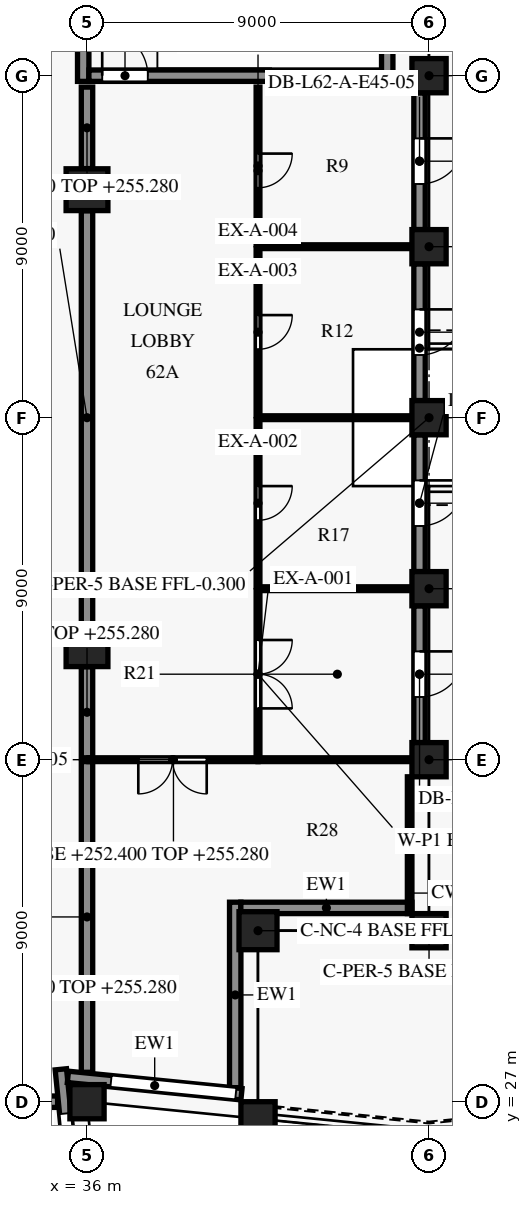
"""IFC4 building model, lengths in metres.
Left out: names, types, materials, properties, quantities, classifications, styles, units other than length and angle.
Written with IfcOpenShell. Run it as: python <this file> out.ifc"""

import sys

from ifc_helpers import new_model, si_unit, direction, frame, frame_2d, origin, origin_2d, place, context, subcontext, project, spatial, rectangle, extrude, element, fill, save


model = new_model("IFC4")
c1 = context("Model", 3, precision=1e-05, world=origin(), true_north=direction((0.0, 1.0)))
c2 = subcontext(c1, "Body", "Model", "MODEL_VIEW")
j1 = project(units=[si_unit("LENGTHUNIT", "METRE"), si_unit("PLANEANGLEUNIT", "RADIAN")], contexts=[c1])
p1 = place(None, origin())
s1 = spatial("IfcSite", under=j1, at=p1, CompositionType="ELEMENT")
p2 = place(p1, origin())
s2 = spatial("IfcBuilding", under=s1, at=p2, CompositionType="ELEMENT")
p3 = place(p2, frame((0.0, 0.0, 252.4)))
s3 = spatial("IfcBuildingStorey", under=s2, at=p3, CompositionType="ELEMENT", Elevation=252.4)
for number, where, z_axis, x_axis in (
    (1, (36.0, 27.0, 0.0), (0.0, 0.0, 1.0), (-0.1, 0.995, 0.0)),
    (2, (40.5, 26.55, 0.0), (0.0, 0.0, 1.0), (0.995, -0.1, 0.0)),
):
    element("IfcColumn", number, at=place(p3, frame(where, z_axis=z_axis, x_axis=x_axis)), inside=s3, PredefinedType="COLUMN", context=c2, shape_type="SweptSolid", body=[
        extrude(rectangle(XDim=0.9, YDim=0.9, at=origin_2d()), origin(), (0.0, 0.0, 1.0), 3.8),
    ])
for number, where, z_axis, x_axis in (
    (3, (45.0, 31.5, -0.3), (0.0, 0.0, 1.0), (0.0, 1.0, 0.0)),
    (4, (45.0, 36.0, -0.3), (0.0, 0.0, 1.0), (0.0, 1.0, 0.0)),
    (5, (45.0, 40.5, -0.3), (0.0, 0.0, 1.0), (0.0, 1.0, 0.0)),
    (6, (45.0, 45.0, -0.3), (0.0, 0.0, 1.0), (0.0, 1.0, 0.0)),
    (7, (45.0, 49.5, -0.3), (0.0, 0.0, 1.0), (0.0, 1.0, 0.0)),
    (8, (45.0, 54.0, -0.3), (0.0, 0.0, 1.0), (0.0, 1.0, 0.0)),
):
    element("IfcColumn", number, at=place(p3, frame(where, z_axis=z_axis, x_axis=x_axis)), inside=s3, PredefinedType="COLUMN", context=c2, shape_type="SweptSolid", body=[
        extrude(rectangle(XDim=0.9, YDim=0.9, at=origin_2d()), origin(), (0.0, 0.0, 1.0), 4.1),
    ])
p4 = place(p3, frame((40.5, 31.5, -0.3), z_axis=(0.0, 0.0, 1.0), x_axis=(1.0, 0.0, 0.0)))
e9 = element("IfcColumn", 9, at=p4, inside=s3, PredefinedType="COLUMN", context=c2, shape_type="SweptSolid", body=[
    extrude(rectangle(XDim=1.0, YDim=1.0, at=origin_2d()), origin(), (0.0, 0.0, 1.0), 4.1),
])
for number, where, z_axis, x_axis in (
    (10, (36.0, 39.0, 0.0), (0.0, 0.0, 1.0), (1.0, 0.0, 0.0)),
    (11, (36.0, 51.0, 0.0), (0.0, 0.0, 1.0), (1.0, 0.0, 0.0)),
):
    element("IfcColumn", number, at=place(p3, frame(where, z_axis=z_axis, x_axis=x_axis)), inside=s3, PredefinedType="COLUMN", context=c2, shape_type="SweptSolid", body=[
        extrude(rectangle(XDim=1.1, YDim=1.1, at=origin_2d()), origin(), (0.0, 0.0, 1.0), 3.8),
    ])
p5 = place(p3, frame((35.312, 27.852, 0.0), z_axis=(0.0, 0.0, 1.0), x_axis=(0.099503719021, -0.99503719021, 0.0)))
e12 = element("IfcWall", 12, at=p5, inside=s3, PredefinedType="SOLIDWALL", context=c2, shape_type="SweptSolid", body=[
    extrude(rectangle(XDim=4.62, YDim=0.3, at=frame_2d((2.31, 0.0))), origin(), (0.0, 0.0, 1.0), 3.15),
])
p6 = place(p5, frame((1.17, 0.0, 0.15)))
e13 = element("IfcOpeningElement", 13, at=p6, cuts=e12, PredefinedType="OPENING", context=c2, shape_type="SweptSolid", body=[
    extrude(rectangle(XDim=3.3, YDim=2.4, at=frame_2d((1.65, 1.2))), frame((0.0, 0.16, 0.0), z_axis=(0.0, -1.0, 0.0), x_axis=(1.0, 0.0, 0.0)), (0.0, 0.0, 1.0), 0.32),
])
p7 = place(p3, frame((40.065, 27.197, 0.0), z_axis=(0.0, 0.0, 1.0), x_axis=(-0.995036663613, 0.099508984853, 0.0)))
e14 = element("IfcWall", 14, at=p7, inside=s3, PredefinedType="SOLIDWALL", context=c2, shape_type="SweptSolid", body=[
    extrude(rectangle(XDim=4.59, YDim=0.3, at=frame_2d((2.295, 0.0))), origin(), (0.0, 0.0, 1.0), 3.15),
])
p8 = place(p7, frame((0.15, 0.0, 0.15)))
e15 = element("IfcOpeningElement", 15, at=p8, cuts=e14, PredefinedType="OPENING", context=c2, shape_type="SweptSolid", body=[
    extrude(rectangle(XDim=3.3, YDim=2.4, at=frame_2d((1.65, 1.2))), frame((0.0, 0.16, 0.0), z_axis=(0.0, -1.0, 0.0), x_axis=(1.0, 0.0, 0.0)), (0.0, 0.0, 1.0), 0.32),
])
p9 = place(p3, frame((39.9, 32.25, 0.0), z_axis=(0.0, 0.0, 1.0), x_axis=(0.0, -1.0, 0.0)))
e16 = element("IfcWall", 16, at=p9, inside=s3, PredefinedType="SOLIDWALL", context=c2, shape_type="SweptSolid", body=[
    extrude(rectangle(XDim=4.881, YDim=0.3, at=frame_2d((2.44, 0.0))), origin(), (0.0, 0.0, 1.0), 3.15),
])
p10 = place(p3, frame((44.55, 32.1, 0.0), z_axis=(0.0, 0.0, 1.0), x_axis=(-1.0, 0.0, 0.0)))
e17 = element("IfcWall", 17, at=p10, inside=s3, PredefinedType="SOLIDWALL", context=c2, shape_type="SweptSolid", body=[
    extrude(rectangle(XDim=4.502, YDim=0.3, at=frame_2d((2.251, 0.0))), origin(), (0.0, 0.0, 1.0), 3.15),
])
p11 = place(p3, frame((44.75, 40.05, 0.0), z_axis=(0.0, 0.0, 1.0), x_axis=(0.0, -1.0, 0.0)))
e18 = element("IfcWall", 18, at=p11, inside=s3, PredefinedType="SOLIDWALL", context=c2, shape_type="SweptSolid", body=[
    extrude(rectangle(XDim=3.6, YDim=0.3, at=frame_2d((1.8, 0.0))), origin(), (0.0, 0.0, 1.0), 3.15),
])
p12 = place(p11, frame((1.2, 0.0, 0.0)))
e19 = element("IfcOpeningElement", 19, at=p12, cuts=e18, PredefinedType="OPENING", context=c2, shape_type="SweptSolid", body=[
    extrude(rectangle(XDim=1.2, YDim=2.5, at=frame_2d((0.6, 1.25))), frame((0.0, 0.16, 0.0), z_axis=(0.0, -1.0, 0.0), x_axis=(1.0, 0.0, 0.0)), (0.0, 0.0, 1.0), 0.32),
])
p13 = place(p3, frame((44.75, 44.55, 0.0), z_axis=(0.0, 0.0, 1.0), x_axis=(0.0, -1.0, 0.0)))
e20 = element("IfcWall", 20, at=p13, inside=s3, PredefinedType="SOLIDWALL", context=c2, shape_type="SweptSolid", body=[
    extrude(rectangle(XDim=3.6, YDim=0.3, at=frame_2d((1.8, 0.0))), origin(), (0.0, 0.0, 1.0), 3.15),
])
p14 = place(p13, frame((1.2, 0.0, 0.0)))
e21 = element("IfcOpeningElement", 21, at=p14, cuts=e20, PredefinedType="OPENING", context=c2, shape_type="SweptSolid", body=[
    extrude(rectangle(XDim=1.2, YDim=2.5, at=frame_2d((0.6, 1.25))), frame((0.0, 0.16, 0.0), z_axis=(0.0, -1.0, 0.0), x_axis=(1.0, 0.0, 0.0)), (0.0, 0.0, 1.0), 0.32),
])
p15 = place(p3, frame((44.75, 49.05, 0.0), z_axis=(0.0, 0.0, 1.0), x_axis=(0.0, -1.0, 0.0)))
e22 = element("IfcWall", 22, at=p15, inside=s3, PredefinedType="SOLIDWALL", context=c2, shape_type="SweptSolid", body=[
    extrude(rectangle(XDim=3.6, YDim=0.3, at=frame_2d((1.8, 0.0))), origin(), (0.0, 0.0, 1.0), 3.15),
])
p16 = place(p15, frame((1.2, 0.0, 0.0)))
e23 = element("IfcOpeningElement", 23, at=p16, cuts=e22, PredefinedType="OPENING", context=c2, shape_type="SweptSolid", body=[
    extrude(rectangle(XDim=1.2, YDim=2.5, at=frame_2d((0.6, 1.25))), frame((0.0, 0.16, 0.0), z_axis=(0.0, -1.0, 0.0), x_axis=(1.0, 0.0, 0.0)), (0.0, 0.0, 1.0), 0.32),
])
p17 = place(p3, frame((44.75, 53.55, 0.0), z_axis=(0.0, 0.0, 1.0), x_axis=(0.0, -1.0, 0.0)))
e24 = element("IfcWall", 24, at=p17, inside=s3, PredefinedType="SOLIDWALL", context=c2, shape_type="SweptSolid", body=[
    extrude(rectangle(XDim=3.6, YDim=0.3, at=frame_2d((1.8, 0.0))), origin(), (0.0, 0.0, 1.0), 3.15),
])
p18 = place(p17, frame((1.2, 0.0, 0.0)))
e25 = element("IfcOpeningElement", 25, at=p18, cuts=e24, PredefinedType="OPENING", context=c2, shape_type="SweptSolid", body=[
    extrude(rectangle(XDim=1.2, YDim=2.5, at=frame_2d((0.6, 1.25))), frame((0.0, 0.16, 0.0), z_axis=(0.0, -1.0, 0.0), x_axis=(1.0, 0.0, 0.0)), (0.0, 0.0, 1.0), 0.32),
])
p19 = place(p3, frame((36.05, 54.0, 0.0), z_axis=(0.0, 0.0, 1.0), x_axis=(1.0, 0.0, 0.0)))
e26 = element("IfcWall", 26, at=p19, inside=s3, PredefinedType="SHEAR", context=c2, shape_type="SweptSolid", body=[
    extrude(rectangle(XDim=7.7, YDim=0.3, at=frame_2d((3.85, 0.0))), origin(), (0.0, 0.0, 1.0), 3.5),
])
p20 = place(p19, frame((0.35, 0.0, 0.0)))
e27 = element("IfcOpeningElement", 27, at=p20, cuts=e26, PredefinedType="OPENING", context=c2, shape_type="SweptSolid", body=[
    extrude(rectangle(XDim=1.2, YDim=2.2, at=frame_2d((0.6, 1.1))), frame((0.0, 0.16, 0.0), z_axis=(0.0, -1.0, 0.0), x_axis=(1.0, 0.0, 0.0)), (0.0, 0.0, 1.0), 0.32),
])
for number, where, z_axis, x_axis in (
    (28, (35.9, 53.85, 0.0), (0.0, 0.0, 1.0), (0.0, 1.0, 0.0)),
    (29, (43.9, 53.85, 0.0), (0.0, 0.0, 1.0), (0.0, 1.0, 0.0)),
):
    element("IfcWall", number, at=place(p3, frame(where, z_axis=z_axis, x_axis=x_axis)), inside=s3, PredefinedType="SHEAR", context=c2, shape_type="SweptSolid", body=[
        extrude(rectangle(XDim=3.9, YDim=0.3, at=frame_2d((1.95, 0.0))), origin(), (0.0, 0.0, 1.0), 3.5),
    ])
p21 = place(p3, frame((27.0, 27.0, 0.0), z_axis=(0.0, 0.0, 1.0), x_axis=(1.0, 0.0, 0.0)))
e30 = element("IfcWall", 30, at=p21, inside=s3, PredefinedType="PARTITIONING", context=c2, shape_type="SweptSolid", body=[
    extrude(rectangle(XDim=8.226, YDim=0.3, at=frame_2d((4.113, 0.0))), origin(), (0.0, 0.0, 1.0), 2.88),
])
p22 = place(p3, frame((36.0, 27.774, 0.0), z_axis=(0.0, 0.0, 1.0), x_axis=(0.0, 1.0, 0.0)))
e31 = element("IfcWall", 31, at=p22, inside=s3, PredefinedType="PARTITIONING", context=c2, shape_type="SweptSolid", body=[
    extrude(rectangle(XDim=8.176, YDim=0.3, at=frame_2d((4.088, 0.0))), origin(), (0.0, 0.0, 1.0), 2.88),
])
p23 = place(p3, frame((40.5, 36.0, 0.0), z_axis=(0.0, 0.0, 1.0), x_axis=(-1.0, 0.0, 0.0)))
e32 = element("IfcWall", 32, at=p23, inside=s3, PredefinedType="PARTITIONING", context=c2, shape_type="SweptSolid", body=[
    extrude(rectangle(XDim=4.45, YDim=0.1, at=frame_2d((2.225, 0.0))), origin(), (0.0, 0.0, 1.0), 2.88),
])
p24 = place(p23, frame((1.35, 0.0, 0.0)))
e33 = element("IfcOpeningElement", 33, at=p24, cuts=e32, PredefinedType="OPENING", context=c2, shape_type="SweptSolid", body=[
    extrude(rectangle(XDim=1.8, YDim=2.1, at=frame_2d((0.9, 1.05))), frame((0.0, 0.06, 0.0), z_axis=(0.0, -1.0, 0.0), x_axis=(1.0, 0.0, 0.0)), (0.0, 0.0, 1.0), 0.12),
])
p25 = place(p3, frame((44.53, 36.0, 0.0), z_axis=(0.0, 0.0, 1.0), x_axis=(-1.0, 0.0, 0.0)))
e34 = element("IfcWall", 34, at=p25, inside=s3, PredefinedType="PARTITIONING", context=c2, shape_type="SweptSolid", body=[
    extrude(rectangle(XDim=4.03, YDim=0.1, at=frame_2d((2.015, 0.0))), origin(), (0.0, 0.0, 1.0), 3.48),
])
p26 = place(p3, frame((36.0, 36.05, 0.0), z_axis=(0.0, 0.0, 1.0), x_axis=(0.0, 1.0, 0.0)))
e35 = element("IfcWall", 35, at=p26, inside=s3, PredefinedType="PARTITIONING", context=c2, shape_type="SweptSolid", body=[
    extrude(rectangle(XDim=2.395, YDim=0.3, at=frame_2d((1.198, 0.0))), origin(), (0.0, 0.0, 1.0), 2.88),
])
p27 = place(p3, frame((36.0, 39.555, 0.0), z_axis=(0.0, 0.0, 1.0), x_axis=(0.0, 1.0, 0.0)))
e36 = element("IfcWall", 36, at=p27, inside=s3, PredefinedType="PARTITIONING", context=c2, shape_type="SweptSolid", body=[
    extrude(rectangle(XDim=10.89, YDim=0.3, at=frame_2d((5.445, 0.0))), origin(), (0.0, 0.0, 1.0), 2.88),
])
p28 = place(p3, frame((40.5, 40.45, 0.0), z_axis=(0.0, 0.0, 1.0), x_axis=(0.0, -1.0, 0.0)))
e37 = element("IfcWall", 37, at=p28, inside=s3, PredefinedType="PARTITIONING", context=c2, shape_type="SweptSolid", body=[
    extrude(rectangle(XDim=4.4, YDim=0.1, at=frame_2d((2.2, 0.0))), origin(), (0.0, 0.0, 1.0), 2.88),
])
p29 = place(p28, frame((1.3, 0.0, 0.0)))
e38 = element("IfcOpeningElement", 38, at=p29, cuts=e37, PredefinedType="OPENING", context=c2, shape_type="SweptSolid", body=[
    extrude(rectangle(XDim=1.8, YDim=2.1, at=frame_2d((0.9, 1.05))), frame((0.0, 0.06, 0.0), z_axis=(0.0, -1.0, 0.0), x_axis=(1.0, 0.0, 0.0)), (0.0, 0.0, 1.0), 0.12),
])
p30 = place(p3, frame((40.55, 40.5, 0.0), z_axis=(0.0, 0.0, 1.0), x_axis=(1.0, 0.0, 0.0)))
e39 = element("IfcWall", 39, at=p30, inside=s3, PredefinedType="PARTITIONING", context=c2, shape_type="SweptSolid", body=[
    extrude(rectangle(XDim=3.98, YDim=0.1, at=frame_2d((1.99, 0.0))), origin(), (0.0, 0.0, 1.0), 3.48),
])
p31 = place(p3, frame((40.5, 44.95, 0.0), z_axis=(0.0, 0.0, 1.0), x_axis=(0.0, -1.0, 0.0)))
e40 = element("IfcWall", 40, at=p31, inside=s3, PredefinedType="PARTITIONING", context=c2, shape_type="SweptSolid", body=[
    extrude(rectangle(XDim=4.4, YDim=0.1, at=frame_2d((2.2, 0.0))), origin(), (0.0, 0.0, 1.0), 3.48),
])
p32 = place(p31, frame((1.75, 0.0, 0.0)))
e41 = element("IfcOpeningElement", 41, at=p32, cuts=e40, PredefinedType="OPENING", context=c2, shape_type="SweptSolid", body=[
    extrude(rectangle(XDim=0.9, YDim=2.1, at=frame_2d((0.45, 1.05))), frame((0.0, 0.06, 0.0), z_axis=(0.0, -1.0, 0.0), x_axis=(1.0, 0.0, 0.0)), (0.0, 0.0, 1.0), 0.12),
])
p33 = place(p3, frame((40.55, 45.0, 0.0), z_axis=(0.0, 0.0, 1.0), x_axis=(1.0, 0.0, 0.0)))
e42 = element("IfcWall", 42, at=p33, inside=s3, PredefinedType="PARTITIONING", context=c2, shape_type="SweptSolid", body=[
    extrude(rectangle(XDim=3.98, YDim=0.1, at=frame_2d((1.99, 0.0))), origin(), (0.0, 0.0, 1.0), 3.48),
])
p34 = place(p3, frame((40.5, 49.45, 0.0), z_axis=(0.0, 0.0, 1.0), x_axis=(0.0, -1.0, 0.0)))
e43 = element("IfcWall", 43, at=p34, inside=s3, PredefinedType="PARTITIONING", context=c2, shape_type="SweptSolid", body=[
    extrude(rectangle(XDim=4.4, YDim=0.1, at=frame_2d((2.2, 0.0))), origin(), (0.0, 0.0, 1.0), 3.48),
])
p35 = place(p34, frame((1.75, 0.0, 0.0)))
e44 = element("IfcOpeningElement", 44, at=p35, cuts=e43, PredefinedType="OPENING", context=c2, shape_type="SweptSolid", body=[
    extrude(rectangle(XDim=0.9, YDim=2.1, at=frame_2d((0.45, 1.05))), frame((0.0, 0.06, 0.0), z_axis=(0.0, -1.0, 0.0), x_axis=(1.0, 0.0, 0.0)), (0.0, 0.0, 1.0), 0.12),
])
p36 = place(p3, frame((40.55, 49.5, 0.0), z_axis=(0.0, 0.0, 1.0), x_axis=(1.0, 0.0, 0.0)))
e45 = element("IfcWall", 45, at=p36, inside=s3, PredefinedType="PARTITIONING", context=c2, shape_type="SweptSolid", body=[
    extrude(rectangle(XDim=3.98, YDim=0.1, at=frame_2d((1.99, 0.0))), origin(), (0.0, 0.0, 1.0), 3.48),
])
p37 = place(p3, frame((36.0, 51.555, 0.0), z_axis=(0.0, 0.0, 1.0), x_axis=(0.0, 1.0, 0.0)))
e46 = element("IfcWall", 46, at=p37, inside=s3, PredefinedType="PARTITIONING", context=c2, shape_type="SweptSolid", body=[
    extrude(rectangle(XDim=2.145, YDim=0.3, at=frame_2d((1.073, 0.0))), origin(), (0.0, 0.0, 1.0), 2.88),
])
p38 = place(p3, frame((40.5, 53.7, 0.0), z_axis=(0.0, 0.0, 1.0), x_axis=(0.0, -1.0, 0.0)))
e47 = element("IfcWall", 47, at=p38, inside=s3, PredefinedType="PARTITIONING", context=c2, shape_type="SweptSolid", body=[
    extrude(rectangle(XDim=4.15, YDim=0.1, at=frame_2d((2.075, 0.0))), origin(), (0.0, 0.0, 1.0), 2.88),
])
p39 = place(p38, frame((1.75, 0.0, 0.0)))
e48 = element("IfcOpeningElement", 48, at=p39, cuts=e47, PredefinedType="OPENING", context=c2, shape_type="SweptSolid", body=[
    extrude(rectangle(XDim=0.9, YDim=2.1, at=frame_2d((0.45, 1.05))), frame((0.0, 0.06, 0.0), z_axis=(0.0, -1.0, 0.0), x_axis=(1.0, 0.0, 0.0)), (0.0, 0.0, 1.0), 0.12),
])
p40 = place(p6, origin())
e49 = element("IfcWindow", 49, at=p40, inside=s3, PartitioningType="SINGLE_PANEL", PredefinedType="WINDOW", context=c2, shape_type="SweptSolid", body=[
    extrude(rectangle(XDim=3.3, YDim=2.4, at=frame_2d((1.65, 1.2))), frame((0.0, 0.03, 0.0), z_axis=(0.0, -1.0, 0.0), x_axis=(1.0, 0.0, 0.0)), (0.0, 0.0, 1.0), 0.06),
])
fill(e13, e49)
p41 = place(p8, origin())
e50 = element("IfcWindow", 50, at=p41, inside=s3, PartitioningType="SINGLE_PANEL", PredefinedType="WINDOW", context=c2, shape_type="SweptSolid", body=[
    extrude(rectangle(XDim=3.3, YDim=2.4, at=frame_2d((1.65, 1.2))), frame((0.0, 0.03, 0.0), z_axis=(0.0, -1.0, 0.0), x_axis=(1.0, 0.0, 0.0)), (0.0, 0.0, 1.0), 0.06),
])
fill(e15, e50)
p42 = place(p12, origin())
e51 = element("IfcDoor", 51, at=p42, inside=s3, OperationType="SINGLE_SWING_RIGHT", PredefinedType="DOOR", context=c2, shape_type="SweptSolid", body=[
    extrude(rectangle(XDim=1.2, YDim=2.5, at=frame_2d((0.6, 1.25))), frame((0.0, 0.025, 0.0), z_axis=(0.0, -1.0, 0.0), x_axis=(1.0, 0.0, 0.0)), (0.0, 0.0, 1.0), 0.05),
])
fill(e19, e51)
p43 = place(p14, origin())
e52 = element("IfcDoor", 52, at=p43, inside=s3, OperationType="SINGLE_SWING_LEFT", PredefinedType="DOOR", context=c2, shape_type="SweptSolid", body=[
    extrude(rectangle(XDim=1.2, YDim=2.5, at=frame_2d((0.6, 1.25))), frame((0.0, 0.025, 0.0), z_axis=(0.0, -1.0, 0.0), x_axis=(1.0, 0.0, 0.0)), (0.0, 0.0, 1.0), 0.05),
])
fill(e21, e52)
p44 = place(p16, origin())
e53 = element("IfcDoor", 53, at=p44, inside=s3, OperationType="SINGLE_SWING_LEFT", PredefinedType="DOOR", context=c2, shape_type="SweptSolid", body=[
    extrude(rectangle(XDim=1.2, YDim=2.5, at=frame_2d((0.6, 1.25))), frame((0.0, 0.025, 0.0), z_axis=(0.0, -1.0, 0.0), x_axis=(1.0, 0.0, 0.0)), (0.0, 0.0, 1.0), 0.05),
])
fill(e23, e53)
p45 = place(p18, origin())
e54 = element("IfcDoor", 54, at=p45, inside=s3, OperationType="SINGLE_SWING_RIGHT", PredefinedType="DOOR", context=c2, shape_type="SweptSolid", body=[
    extrude(rectangle(XDim=1.2, YDim=2.5, at=frame_2d((0.6, 1.25))), frame((0.0, 0.025, 0.0), z_axis=(0.0, -1.0, 0.0), x_axis=(1.0, 0.0, 0.0)), (0.0, 0.0, 1.0), 0.05),
])
fill(e25, e54)
p46 = place(p20, origin())
e55 = element("IfcDoor", 55, at=p46, inside=s3, OperationType="SINGLE_SWING_LEFT", PredefinedType="DOOR", context=c2, shape_type="SweptSolid", body=[
    extrude(rectangle(XDim=1.2, YDim=2.2, at=frame_2d((0.6, 1.1))), frame((0.0, 0.025, 0.0), z_axis=(0.0, -1.0, 0.0), x_axis=(1.0, 0.0, 0.0)), (0.0, 0.0, 1.0), 0.05),
])
fill(e27, e55)
p47 = place(p29, origin())
e56 = element("IfcDoor", 56, at=p47, inside=s3, OperationType="DOUBLE_DOOR_SINGLE_SWING", PredefinedType="DOOR", context=c2, shape_type="SweptSolid", body=[
    extrude(rectangle(XDim=1.8, YDim=2.1, at=frame_2d((0.9, 1.05))), frame((0.0, 0.025, 0.0), z_axis=(0.0, -1.0, 0.0), x_axis=(1.0, 0.0, 0.0)), (0.0, 0.0, 1.0), 0.05),
])
fill(e38, e56)
p48 = place(p32, origin())
e57 = element("IfcDoor", 57, at=p48, inside=s3, OperationType="SINGLE_SWING_LEFT", PredefinedType="DOOR", context=c2, shape_type="SweptSolid", body=[
    extrude(rectangle(XDim=0.9, YDim=2.1, at=frame_2d((0.45, 1.05))), frame((0.0, 0.025, 0.0), z_axis=(0.0, -1.0, 0.0), x_axis=(1.0, 0.0, 0.0)), (0.0, 0.0, 1.0), 0.05),
])
fill(e41, e57)
p49 = place(p35, origin())
e58 = element("IfcDoor", 58, at=p49, inside=s3, OperationType="SINGLE_SWING_LEFT", PredefinedType="DOOR", context=c2, shape_type="SweptSolid", body=[
    extrude(rectangle(XDim=0.9, YDim=2.1, at=frame_2d((0.45, 1.05))), frame((0.0, 0.025, 0.0), z_axis=(0.0, -1.0, 0.0), x_axis=(1.0, 0.0, 0.0)), (0.0, 0.0, 1.0), 0.05),
])
fill(e44, e58)
p50 = place(p39, origin())
e59 = element("IfcDoor", 59, at=p50, inside=s3, OperationType="SINGLE_SWING_LEFT", PredefinedType="DOOR", context=c2, shape_type="SweptSolid", body=[
    extrude(rectangle(XDim=0.9, YDim=2.1, at=frame_2d((0.45, 1.05))), frame((0.0, 0.025, 0.0), z_axis=(0.0, -1.0, 0.0), x_axis=(1.0, 0.0, 0.0)), (0.0, 0.0, 1.0), 0.05),
])
fill(e48, e59)
p51 = place(p24, origin())
e60 = element("IfcDoor", 60, at=p51, inside=s3, OperationType="DOUBLE_DOOR_SINGLE_SWING", PredefinedType="DOOR", context=c2, shape_type="SweptSolid", body=[
    extrude(rectangle(XDim=1.8, YDim=2.1, at=frame_2d((0.9, 1.05))), frame((0.0, 0.025, 0.0), z_axis=(0.0, -1.0, 0.0), x_axis=(1.0, 0.0, 0.0)), (0.0, 0.0, 1.0), 0.05),
])
fill(e33, e60)
save(model, sys.argv[1])
